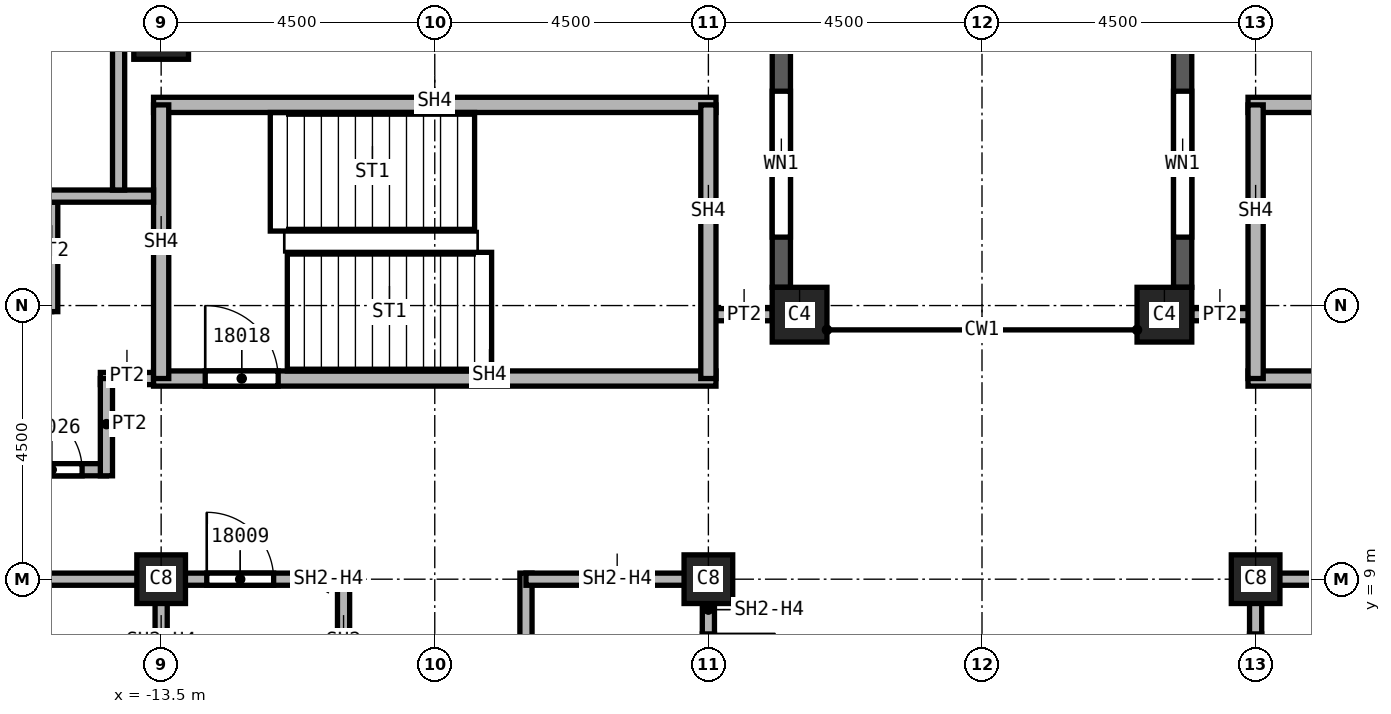
"""IFC4 building model, lengths in metres.
Left out: names, types, materials, properties, quantities, classifications, styles, units other than length and angle.
Written with IfcOpenShell. Run it as: python <this file> out.ifc"""

import sys

from ifc_helpers import new_model, si_unit, direction, frame, frame_2d, origin, origin_2d, place, context, subcontext, project, spatial, rectangle, extrude, element, fill, save


model = new_model("IFC4")
c1 = context("Model", 3, precision=1e-05, world=origin(), true_north=direction((0.0, 1.0)))
c2 = subcontext(c1, "Body", "Model", "MODEL_VIEW")
j1 = project(units=[si_unit("LENGTHUNIT", "METRE"), si_unit("PLANEANGLEUNIT", "RADIAN")], contexts=[c1])
p1 = place(None, origin())
s1 = spatial("IfcSite", under=j1, at=p1, CompositionType="ELEMENT")
p2 = place(p1, origin())
s2 = spatial("IfcBuilding", under=s1, at=p2, CompositionType="ELEMENT")
p3 = place(p2, frame((0.0, 0.0, 266.0)))
s3 = spatial("IfcBuildingStorey", under=s2, at=p3, CompositionType="ELEMENT", Elevation=266.0)
p4 = place(p3, frame((-13.5, 18.0, 0.0), z_axis=(0.0, 0.0, 1.0), x_axis=(1.0, 0.0, 0.0)))
e1 = element("IfcColumn", 1, at=p4, inside=s3, PredefinedType="COLUMN", context=c2, shape_type="SweptSolid", body=[
    extrude(rectangle(XDim=0.9, YDim=0.9, at=origin_2d()), origin(), (0.0, 0.0, 1.0), 3.72),
])
for number, where, z_axis, x_axis in (
    (2, (4.5, 9.0, 0.0), (0.0, 0.0, 1.0), (1.0, 0.0, 0.0)),
    (3, (-4.5, 9.0, 0.0), (0.0, 0.0, 1.0), (1.0, 0.0, 0.0)),
    (4, (-13.5, 9.0, 0.0), (0.0, 0.0, 1.0), (1.0, 0.0, 0.0)),
):
    element("IfcColumn", number, at=place(p3, frame(where, z_axis=z_axis, x_axis=x_axis)), inside=s3, PredefinedType="COLUMN", context=c2, shape_type="SweptSolid", body=[
        extrude(rectangle(XDim=0.8, YDim=0.8, at=origin_2d()), origin(), (0.0, 0.0, 1.0), 3.72),
    ])
for number, where, z_axis, x_axis in (
    (5, (3.0, 13.35, 0.0), (0.0, 0.0, 1.0), (1.0, 0.0, 0.0)),
    (6, (-3.0, 13.35, 0.0), (0.0, 0.0, 1.0), (1.0, 0.0, 0.0)),
):
    element("IfcColumn", number, at=place(p3, frame(where, z_axis=z_axis, x_axis=x_axis)), inside=s3, PredefinedType="COLUMN", context=c2, shape_type="SweptSolid", body=[
        extrude(rectangle(XDim=0.9, YDim=0.9, at=origin_2d()), origin(), (0.0, 0.0, 1.0), 3.72),
    ])
p5 = place(p3, frame((3.3, 21.9, 0.0), z_axis=(0.0, 0.0, 1.0), x_axis=(0.0, -1.0, 0.0)))
e7 = element("IfcWall", 7, at=p5, inside=s3, PredefinedType="SOLIDWALL", context=c2, shape_type="SweptSolid", body=[
    extrude(rectangle(XDim=8.1, YDim=0.3, at=frame_2d((4.05, 0.0))), origin(), (0.0, 0.0, 1.0), 3.12),
])
p6 = place(p5, frame((0.825, 0.0, 0.8)))
e8 = element("IfcOpeningElement", 8, at=p6, cuts=e7, PredefinedType="OPENING", context=c2, shape_type="SweptSolid", body=[
    extrude(rectangle(XDim=2.4, YDim=1.95, at=frame_2d((1.2, 0.975))), frame((0.0, 0.15, 0.0), z_axis=(0.0, -1.0, 0.0), x_axis=(1.0, 0.0, 0.0)), (0.0, 0.0, 1.0), 0.3),
])
p7 = place(p5, frame((4.875, 0.0, 0.8)))
e9 = element("IfcOpeningElement", 9, at=p7, cuts=e7, PredefinedType="OPENING", context=c2, shape_type="SweptSolid", body=[
    extrude(rectangle(XDim=2.4, YDim=1.95, at=frame_2d((1.2, 0.975))), frame((0.0, 0.15, 0.0), z_axis=(0.0, -1.0, 0.0), x_axis=(1.0, 0.0, 0.0)), (0.0, 0.0, 1.0), 0.3),
])
p8 = place(p3, frame((-3.3, 13.8, 0.0), z_axis=(0.0, 0.0, 1.0), x_axis=(0.0, 1.0, 0.0)))
e10 = element("IfcWall", 10, at=p8, inside=s3, PredefinedType="SOLIDWALL", context=c2, shape_type="SweptSolid", body=[
    extrude(rectangle(XDim=8.1, YDim=0.3, at=frame_2d((4.05, 0.0))), origin(), (0.0, 0.0, 1.0), 3.12),
])
p9 = place(p8, frame((0.825, 0.0, 0.8)))
e11 = element("IfcOpeningElement", 11, at=p9, cuts=e10, PredefinedType="OPENING", context=c2, shape_type="SweptSolid", body=[
    extrude(rectangle(XDim=2.4, YDim=1.95, at=frame_2d((1.2, 0.975))), frame((0.0, 0.15, 0.0), z_axis=(0.0, -1.0, 0.0), x_axis=(1.0, 0.0, 0.0)), (0.0, 0.0, 1.0), 0.3),
])
p10 = place(p8, frame((4.875, 0.0, 0.8)))
e12 = element("IfcOpeningElement", 12, at=p10, cuts=e10, PredefinedType="OPENING", context=c2, shape_type="SweptSolid", body=[
    extrude(rectangle(XDim=2.4, YDim=1.95, at=frame_2d((1.2, 0.975))), frame((0.0, 0.15, 0.0), z_axis=(0.0, -1.0, 0.0), x_axis=(1.0, 0.0, 0.0)), (0.0, 0.0, 1.0), 0.3),
])
p11 = place(p3, frame((-18.0, 10.8, 0.0), z_axis=(0.0, 0.0, 1.0), x_axis=(1.0, 0.0, 0.0)))
e13 = element("IfcWall", 13, at=p11, inside=s3, PredefinedType="PARTITIONING", context=c2, shape_type="SweptSolid", body=[
    extrude(rectangle(XDim=3.6, YDim=0.2, at=frame_2d((1.8, 0.0))), origin(), (0.0, 0.0, 1.0), 3.72),
])
p12 = place(p11, frame((2.2, 0.0, 0.0)))
e14 = element("IfcOpeningElement", 14, at=p12, cuts=e13, PredefinedType="OPENING", context=c2, shape_type="SweptSolid", body=[
    extrude(rectangle(XDim=1.0, YDim=2.1, at=frame_2d((0.5, 1.05))), frame((0.0, 0.1, 0.0), z_axis=(0.0, -1.0, 0.0), x_axis=(1.0, 0.0, 0.0)), (0.0, 0.0, 1.0), 0.2),
])
p13 = place(p3, frame((-15.3, 15.2, 0.0), z_axis=(0.0, 0.0, 1.0), x_axis=(0.0, -1.0, 0.0)))
e15 = element("IfcWall", 15, at=p13, inside=s3, PredefinedType="PARTITIONING", context=c2, shape_type="SweptSolid", body=[
    extrude(rectangle(XDim=1.8, YDim=0.2, at=frame_2d((0.9, 0.0))), origin(), (0.0, 0.0, 1.0), 3.72),
])
p14 = place(p3, frame((-14.5, 12.3, 0.0), z_axis=(0.0, 0.0, 1.0), x_axis=(1.0, 0.0, 0.0)))
e16 = element("IfcWall", 16, at=p14, inside=s3, PredefinedType="PARTITIONING", context=c2, shape_type="SweptSolid", body=[
    extrude(rectangle(XDim=1.125, YDim=0.2, at=frame_2d((0.562, 0.0))), origin(), (0.0, 0.0, 1.0), 3.72),
])
p15 = place(p3, frame((-13.5, 9.0, 0.0), z_axis=(0.0, 0.0, 1.0), x_axis=(-1.0, 0.0, 0.0)))
e17 = element("IfcWall", 17, at=p15, inside=s3, PredefinedType="PARTITIONING", context=c2, shape_type="SweptSolid", body=[
    extrude(rectangle(XDim=4.5, YDim=0.2, at=frame_2d((2.25, 0.0))), origin(), (0.0, 0.0, 1.0), 3.72),
])
p16 = place(p3, frame((-14.4, 10.7, 0.0), z_axis=(0.0, 0.0, 1.0), x_axis=(0.0, 1.0, 0.0)))
e18 = element("IfcWall", 18, at=p16, inside=s3, PredefinedType="PARTITIONING", context=c2, shape_type="SweptSolid", body=[
    extrude(rectangle(XDim=1.6, YDim=0.2, at=frame_2d((0.8, 0.0))), origin(), (0.0, 0.0, 1.0), 3.72),
])
for number, where, z_axis, x_axis in (
    (19, (-4.5, 13.35, 0.0), (0.0, 0.0, 1.0), (1.0, 0.0, 0.0)),
    (20, (3.45, 13.35, 0.0), (0.0, 0.0, 1.0), (1.0, 0.0, 0.0)),
):
    element("IfcWall", number, at=place(p3, frame(where, z_axis=z_axis, x_axis=x_axis)), inside=s3, PredefinedType="PARTITIONING", context=c2, shape_type="SweptSolid", body=[
        extrude(rectangle(XDim=1.05, YDim=0.2, at=frame_2d((0.525, 0.0))), origin(), (0.0, 0.0, 1.0), 3.72),
    ])
p17 = place(p3, frame((-13.6, 9.0, 0.0), z_axis=(0.0, 0.0, 1.0), x_axis=(1.0, 0.0, 0.0)))
e21 = element("IfcWall", 21, at=p17, inside=s3, PredefinedType="SOLIDWALL", context=c2, shape_type="SweptSolid", body=[
    extrude(rectangle(XDim=3.1, YDim=0.2, at=frame_2d((1.55, 0.0))), origin(), (0.0, 0.0, 1.0), 3.042),
])
p18 = place(p17, frame((0.85, 0.0, 0.0)))
e22 = element("IfcOpeningElement", 22, at=p18, cuts=e21, PredefinedType="OPENING", context=c2, shape_type="SweptSolid", body=[
    extrude(rectangle(XDim=1.1, YDim=2.1, at=frame_2d((0.55, 1.05))), frame((0.0, 0.1, 0.0), z_axis=(0.0, -1.0, 0.0), x_axis=(1.0, 0.0, 0.0)), (0.0, 0.0, 1.0), 0.2),
])
p19 = place(p3, frame((-13.5, 7.0, 0.0), z_axis=(0.0, 0.0, 1.0), x_axis=(0.0, 1.0, 0.0)))
e23 = element("IfcWall", 23, at=p19, inside=s3, PredefinedType="SOLIDWALL", context=c2, shape_type="SweptSolid", body=[
    extrude(rectangle(XDim=2.1, YDim=0.2, at=frame_2d((1.05, 0.0))), origin(), (0.0, 0.0, 1.0), 3.042),
])
p20 = place(p3, frame((-10.5, 6.925, 0.0), z_axis=(0.0, 0.0, 1.0), x_axis=(0.0, 1.0, 0.0)))
e24 = element("IfcWall", 24, at=p20, inside=s3, PredefinedType="SOLIDWALL", context=c2, shape_type="SweptSolid", body=[
    extrude(rectangle(XDim=2.175, YDim=0.2, at=frame_2d((1.087, 0.0))), origin(), (0.0, 0.0, 1.0), 3.72),
])
p21 = place(p3, frame((-7.5, 6.0, 0.0), z_axis=(0.0, 0.0, 1.0), x_axis=(0.0, 1.0, 0.0)))
e25 = element("IfcWall", 25, at=p21, inside=s3, PredefinedType="SOLIDWALL", context=c2, shape_type="SweptSolid", body=[
    extrude(rectangle(XDim=3.1, YDim=0.2, at=frame_2d((1.55, 0.0))), origin(), (0.0, 0.0, 1.0), 3.72),
])
p22 = place(p3, frame((-7.5, 9.0, 0.0), z_axis=(0.0, 0.0, 1.0), x_axis=(1.0, 0.0, 0.0)))
e26 = element("IfcWall", 26, at=p22, inside=s3, PredefinedType="SOLIDWALL", context=c2, shape_type="SweptSolid", body=[
    extrude(rectangle(XDim=3.0, YDim=0.2, at=frame_2d((1.5, 0.0))), origin(), (0.0, 0.0, 1.0), 3.042),
])
p23 = place(p3, frame((-4.5, 9.1, 0.0), z_axis=(0.0, 0.0, 1.0), x_axis=(0.0, -1.0, 0.0)))
e27 = element("IfcWall", 27, at=p23, inside=s3, PredefinedType="SOLIDWALL", context=c2, shape_type="SweptSolid", body=[
    extrude(rectangle(XDim=3.1, YDim=0.2, at=frame_2d((1.55, 0.0))), origin(), (0.0, 0.0, 1.0), 3.042),
])
p24 = place(p23, frame((1.0, 0.0, 0.0)))
e28 = element("IfcOpeningElement", 28, at=p24, cuts=e27, PredefinedType="OPENING", context=c2, shape_type="SweptSolid", body=[
    extrude(rectangle(XDim=1.1, YDim=2.1, at=frame_2d((0.55, 1.05))), frame((0.0, 0.1, 0.0), z_axis=(0.0, -1.0, 0.0), x_axis=(1.0, 0.0, 0.0)), (0.0, 0.0, 1.0), 0.2),
])
p25 = place(p3, frame((4.5, 0.0, 0.0), z_axis=(0.0, 0.0, 1.0), x_axis=(0.0, 1.0, 0.0)))
e29 = element("IfcWall", 29, at=p25, inside=s3, PredefinedType="SOLIDWALL", context=c2, shape_type="SweptSolid", body=[
    extrude(rectangle(XDim=9.1, YDim=0.2, at=frame_2d((4.55, 0.0))), origin(), (0.0, 0.0, 1.0), 3.042),
])
p26 = place(p25, frame((3.4, 0.0, 0.0)))
e30 = element("IfcOpeningElement", 30, at=p26, cuts=e29, PredefinedType="OPENING", context=c2, shape_type="SweptSolid", body=[
    extrude(rectangle(XDim=1.1, YDim=2.1, at=frame_2d((0.55, 1.05))), frame((0.0, 0.1, 0.0), z_axis=(0.0, -1.0, 0.0), x_axis=(1.0, 0.0, 0.0)), (0.0, 0.0, 1.0), 0.2),
])
p27 = place(p25, frame((7.0, 0.0, 0.0)))
e31 = element("IfcOpeningElement", 31, at=p27, cuts=e29, PredefinedType="OPENING", context=c2, shape_type="SweptSolid", body=[
    extrude(rectangle(XDim=1.1, YDim=2.1, at=frame_2d((0.55, 1.05))), frame((0.0, 0.1, 0.0), z_axis=(0.0, -1.0, 0.0), x_axis=(1.0, 0.0, 0.0)), (0.0, 0.0, 1.0), 0.2),
])
p28 = place(p3, frame((4.5, 9.0, 0.0), z_axis=(0.0, 0.0, 1.0), x_axis=(1.0, 0.0, 0.0)))
e32 = element("IfcWall", 32, at=p28, inside=s3, PredefinedType="SOLIDWALL", context=c2, shape_type="SweptSolid", body=[
    extrude(rectangle(XDim=3.0, YDim=0.2, at=frame_2d((1.5, 0.0))), origin(), (0.0, 0.0, 1.0), 3.042),
])
p29 = place(p3, frame((-13.625, 12.3, 0.0), z_axis=(0.0, 0.0, 1.0), x_axis=(1.0, 0.0, 0.0)))
e33 = element("IfcWall", 33, at=p29, inside=s3, PredefinedType="SOLIDWALL", context=c2, shape_type="SweptSolid", body=[
    extrude(rectangle(XDim=9.25, YDim=0.25, at=frame_2d((4.625, 0.0))), origin(), (0.0, 0.0, 1.0), 3.72),
])
p30 = place(p29, frame((0.85, 0.0, 0.0)))
e34 = element("IfcOpeningElement", 34, at=p30, cuts=e33, PredefinedType="OPENING", context=c2, shape_type="SweptSolid", body=[
    extrude(rectangle(XDim=1.2, YDim=2.1, at=frame_2d((0.6, 1.05))), frame((0.0, 0.125, 0.0), z_axis=(0.0, -1.0, 0.0), x_axis=(1.0, 0.0, 0.0)), (0.0, 0.0, 1.0), 0.25),
])
p31 = place(p3, frame((-13.625, 16.8, 0.0), z_axis=(0.0, 0.0, 1.0), x_axis=(1.0, 0.0, 0.0)))
e35 = element("IfcWall", 35, at=p31, inside=s3, PredefinedType="SOLIDWALL", context=c2, shape_type="SweptSolid", body=[
    extrude(rectangle(XDim=9.25, YDim=0.25, at=frame_2d((4.625, 0.0))), origin(), (0.0, 0.0, 1.0), 3.72),
])
for number, where, z_axis, x_axis in (
    (36, (-13.5, 12.3, 0.0), (0.0, 0.0, 1.0), (0.0, 1.0, 0.0)),
    (37, (-4.5, 16.8, 0.0), (0.0, 0.0, 1.0), (0.0, -1.0, 0.0)),
):
    element("IfcWall", number, at=place(p3, frame(where, z_axis=z_axis, x_axis=x_axis)), inside=s3, PredefinedType="SOLIDWALL", context=c2, shape_type="SweptSolid", body=[
        extrude(rectangle(XDim=4.5, YDim=0.25, at=frame_2d((2.25, 0.0))), origin(), (0.0, 0.0, 1.0), 3.72),
    ])
p32 = place(p3, frame((4.375, 12.3, 0.0), z_axis=(0.0, 0.0, 1.0), x_axis=(1.0, 0.0, 0.0)))
e38 = element("IfcWall", 38, at=p32, inside=s3, PredefinedType="SOLIDWALL", context=c2, shape_type="SweptSolid", body=[
    extrude(rectangle(XDim=9.25, YDim=0.25, at=frame_2d((4.625, 0.0))), origin(), (0.0, 0.0, 1.0), 3.72),
])
p33 = place(p32, frame((7.2, 0.0, 0.0)))
e39 = element("IfcOpeningElement", 39, at=p33, cuts=e38, PredefinedType="OPENING", context=c2, shape_type="SweptSolid", body=[
    extrude(rectangle(XDim=1.2, YDim=2.1, at=frame_2d((0.6, 1.05))), frame((0.0, 0.125, 0.0), z_axis=(0.0, -1.0, 0.0), x_axis=(1.0, 0.0, 0.0)), (0.0, 0.0, 1.0), 0.25),
])
p34 = place(p3, frame((4.375, 16.8, 0.0), z_axis=(0.0, 0.0, 1.0), x_axis=(1.0, 0.0, 0.0)))
e40 = element("IfcWall", 40, at=p34, inside=s3, PredefinedType="SOLIDWALL", context=c2, shape_type="SweptSolid", body=[
    extrude(rectangle(XDim=9.25, YDim=0.25, at=frame_2d((4.625, 0.0))), origin(), (0.0, 0.0, 1.0), 3.72),
])
p35 = place(p3, frame((4.5, 12.3, 0.0), z_axis=(0.0, 0.0, 1.0), x_axis=(0.0, 1.0, 0.0)))
e41 = element("IfcWall", 41, at=p35, inside=s3, PredefinedType="SOLIDWALL", context=c2, shape_type="SweptSolid", body=[
    extrude(rectangle(XDim=4.5, YDim=0.25, at=frame_2d((2.25, 0.0))), origin(), (0.0, 0.0, 1.0), 3.72),
])
p36 = place(p3, frame((-21.9, 15.3, 0.0), z_axis=(0.0, 0.0, 1.0), x_axis=(1.0, 0.0, 0.0)))
e42 = element("IfcWall", 42, at=p36, inside=s3, PredefinedType="SOLIDWALL", context=c2, shape_type="SweptSolid", body=[
    extrude(rectangle(XDim=8.275, YDim=0.2, at=frame_2d((4.137, 0.0))), origin(), (0.0, 0.0, 1.0), 3.72),
])
p37 = place(p36, frame((4.8, 0.0, 0.0)))
e43 = element("IfcOpeningElement", 43, at=p37, cuts=e42, PredefinedType="OPENING", context=c2, shape_type="SweptSolid", body=[
    extrude(rectangle(XDim=1.2, YDim=2.1, at=frame_2d((0.6, 1.05))), frame((0.0, 0.1, 0.0), z_axis=(0.0, -1.0, 0.0), x_axis=(1.0, 0.0, 0.0)), (0.0, 0.0, 1.0), 0.2),
])
p38 = place(p3, frame((-14.2, 15.4, 0.0), z_axis=(0.0, 0.0, 1.0), x_axis=(0.0, 1.0, 0.0)))
e44 = element("IfcWall", 44, at=p38, inside=s3, PredefinedType="SOLIDWALL", context=c2, shape_type="SweptSolid", body=[
    extrude(rectangle(XDim=5.9, YDim=0.2, at=frame_2d((2.95, 0.0))), origin(), (0.0, 0.0, 1.0), 3.72),
])
p39 = place(p7, origin())
e45 = element("IfcWindow", 45, at=p39, inside=s3, PartitioningType="SINGLE_PANEL", PredefinedType="WINDOW", context=c2, shape_type="SweptSolid", body=[
    extrude(rectangle(XDim=2.4, YDim=1.95, at=frame_2d((1.2, 0.975))), frame((0.0, 0.03, 0.0), z_axis=(0.0, -1.0, 0.0), x_axis=(1.0, 0.0, 0.0)), (0.0, 0.0, 1.0), 0.06),
])
fill(e9, e45)
p40 = place(p9, origin())
e46 = element("IfcWindow", 46, at=p40, inside=s3, PartitioningType="SINGLE_PANEL", PredefinedType="WINDOW", context=c2, shape_type="SweptSolid", body=[
    extrude(rectangle(XDim=2.4, YDim=1.95, at=frame_2d((1.2, 0.975))), frame((0.0, 0.03, 0.0), z_axis=(0.0, -1.0, 0.0), x_axis=(1.0, 0.0, 0.0)), (0.0, 0.0, 1.0), 0.06),
])
fill(e11, e46)
p41 = place(p18, origin())
e47 = element("IfcDoor", 47, at=p41, inside=s3, OperationType="SINGLE_SWING_RIGHT", PredefinedType="DOOR", context=c2, shape_type="SweptSolid", body=[
    extrude(rectangle(XDim=1.1, YDim=2.1, at=frame_2d((0.55, 1.05))), frame((0.0, 0.025, 0.0), z_axis=(0.0, -1.0, 0.0), x_axis=(1.0, 0.0, 0.0)), (0.0, 0.0, 1.0), 0.05),
])
fill(e22, e47)
p42 = place(p30, origin())
e48 = element("IfcDoor", 48, at=p42, inside=s3, OperationType="SINGLE_SWING_LEFT", PredefinedType="DOOR", context=c2, shape_type="SweptSolid", body=[
    extrude(rectangle(XDim=1.2, YDim=2.1, at=frame_2d((0.6, 1.05))), frame((0.0, 0.025, 0.0), z_axis=(0.0, -1.0, 0.0), x_axis=(1.0, 0.0, 0.0)), (0.0, 0.0, 1.0), 0.05),
])
fill(e34, e48)
p43 = place(p12, origin())
e49 = element("IfcDoor", 49, at=p43, inside=s3, OperationType="SINGLE_SWING_LEFT", PredefinedType="DOOR", context=c2, shape_type="SweptSolid", body=[
    extrude(rectangle(XDim=1.0, YDim=2.1, at=frame_2d((0.5, 1.05))), frame((0.0, 0.025, 0.0), z_axis=(0.0, -1.0, 0.0), x_axis=(1.0, 0.0, 0.0)), (0.0, 0.0, 1.0), 0.05),
])
fill(e14, e49)
save(model, sys.argv[1])
